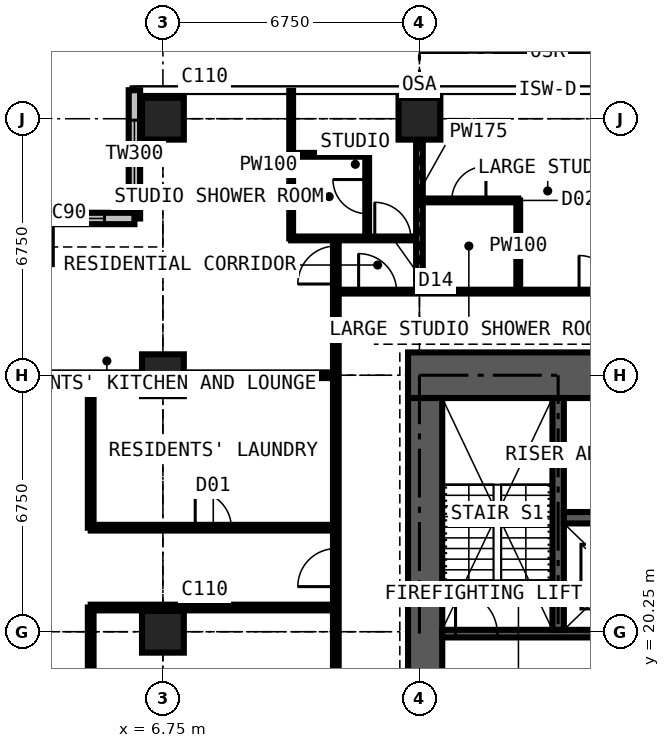
"""IFC4 building model, lengths in metres.
Left out: names, types, materials, properties, quantities, classifications, styles, units other than length and angle.
Written with IfcOpenShell. Run it as: python <this file> out.ifc"""

import sys

from ifc_helpers import new_model, si_unit, direction, frame, frame_2d, origin, origin_2d, place, context, subcontext, project, spatial, rectangle, extrude, element, fill, save


model = new_model("IFC4")
c1 = context("Model", 3, precision=1e-05, world=origin(), true_north=direction((0.0, 1.0)))
c2 = subcontext(c1, "Body", "Model", "MODEL_VIEW")
j1 = project(units=[si_unit("LENGTHUNIT", "METRE"), si_unit("PLANEANGLEUNIT", "RADIAN")], contexts=[c1])
p1 = place(None, origin())
s1 = spatial("IfcSite", under=j1, at=p1, CompositionType="ELEMENT")
p2 = place(p1, origin())
s2 = spatial("IfcBuilding", under=s1, at=p2, CompositionType="ELEMENT")
p3 = place(p2, frame((0.0, 0.0, 215.1)))
s3 = spatial("IfcBuildingStorey", under=s2, at=p3, CompositionType="ELEMENT", Elevation=215.1)
for number, where, z_axis, x_axis in (
    (1, (6.75, 20.25, 0.0), (0.0, 0.0, 1.0), (1.0, 0.0, 0.0)),
    (2, (6.75, 27.0, 0.0), (0.0, 0.0, 1.0), (1.0, 0.0, 0.0)),
    (3, (6.75, 33.75, 0.0), (0.0, 0.0, 1.0), (1.0, 0.0, 0.0)),
    (4, (13.5, 33.75, 0.0), (0.0, 0.0, 1.0), (1.0, 0.0, 0.0)),
):
    element("IfcColumn", number, at=place(p3, frame(where, z_axis=z_axis, x_axis=x_axis)), inside=s3, PredefinedType="COLUMN", context=c2, shape_type="SweptSolid", body=[
        extrude(rectangle(XDim=1.1, YDim=1.1, at=origin_2d()), origin(), (0.0, 0.0, 1.0), 3.6),
    ])
p4 = place(p3, frame((27.3, 27.0, 0.0), z_axis=(0.0, 0.0, 1.0), x_axis=(-1.0, 0.0, 0.0)))
e5 = element("IfcWall", 5, at=p4, inside=s3, PredefinedType="SHEAR", context=c2, shape_type="SweptSolid", body=[
    extrude(rectangle(XDim=14.1, YDim=1.2, at=frame_2d((7.05, 0.0))), origin(), (0.0, 0.0, 1.0), 3.6),
])
p5 = place(p4, frame((4.55, 0.0, 0.0)))
e6 = element("IfcOpeningElement", 6, at=p5, cuts=e5, PredefinedType="OPENING", context=c2, shape_type="SweptSolid", body=[
    extrude(rectangle(XDim=0.9, YDim=2.2, at=frame_2d((0.45, 1.1))), frame((0.0, 0.61, 0.0), z_axis=(0.0, -1.0, 0.0), x_axis=(1.0, 0.0, 0.0)), (0.0, 0.0, 1.0), 1.22),
])
p6 = place(p4, frame((7.525, 0.0, 0.0)))
e7 = element("IfcOpeningElement", 7, at=p6, cuts=e5, PredefinedType="OPENING", context=c2, shape_type="SweptSolid", body=[
    extrude(rectangle(XDim=1.0, YDim=2.2, at=frame_2d((0.5, 1.1))), frame((0.0, 0.61, 0.0), z_axis=(0.0, -1.0, 0.0), x_axis=(1.0, 0.0, 0.0)), (0.0, 0.0, 1.0), 1.22),
])
p7 = place(p3, frame((13.65, 26.4, 0.0), z_axis=(0.0, 0.0, 1.0), x_axis=(0.0, -1.0, 0.0)))
e8 = element("IfcWall", 8, at=p7, inside=s3, PredefinedType="SHEAR", context=c2, shape_type="SweptSolid", body=[
    extrude(rectangle(XDim=12.3, YDim=0.9, at=frame_2d((6.15, 0.0))), origin(), (0.0, 0.0, 1.0), 3.6),
])
p8 = place(p7, frame((7.45, 0.0, 0.0)))
e9 = element("IfcOpeningElement", 9, at=p8, cuts=e8, PredefinedType="OPENING", context=c2, shape_type="SweptSolid", body=[
    extrude(rectangle(XDim=1.2, YDim=2.2, at=frame_2d((0.6, 1.1))), frame((0.0, 0.46, 0.0), z_axis=(0.0, -1.0, 0.0), x_axis=(1.0, 0.0, 0.0)), (0.0, 0.0, 1.0), 0.92),
])
p9 = place(p3, frame((6.0, 34.5, 0.0), z_axis=(0.0, 0.0, 1.0), x_axis=(0.0, -1.0, 0.0)))
e10 = element("IfcWall", 10, at=p9, inside=s3, PredefinedType="SOLIDWALL", context=c2, shape_type="SweptSolid", body=[
    extrude(rectangle(XDim=3.375, YDim=0.3, at=frame_2d((1.688, 0.0))), origin(), (0.0, 0.0, 1.0), 3.375),
])
p10 = place(p9, frame((0.788, 0.0, 0.6)))
e11 = element("IfcOpeningElement", 11, at=p10, cuts=e10, PredefinedType="OPENING", context=c2, shape_type="SweptSolid", body=[
    extrude(rectangle(XDim=1.8, YDim=2.1, at=frame_2d((0.9, 1.05))), frame((0.0, 0.16, 0.0), z_axis=(0.0, -1.0, 0.0), x_axis=(1.0, 0.0, 0.0)), (0.0, 0.0, 1.0), 0.32),
])
p11 = place(p3, frame((6.0, 31.125, 0.0), z_axis=(0.0, 0.0, 1.0), x_axis=(-1.0, 0.0, 0.0)))
e12 = element("IfcWall", 12, at=p11, inside=s3, PredefinedType="SOLIDWALL", context=c2, shape_type="SweptSolid", body=[
    extrude(rectangle(XDim=3.375, YDim=0.3, at=frame_2d((1.688, 0.0))), origin(), (0.0, 0.0, 1.0), 3.375),
])
p12 = place(p11, frame((0.788, 0.0, 0.6)))
e13 = element("IfcOpeningElement", 13, at=p12, cuts=e12, PredefinedType="OPENING", context=c2, shape_type="SweptSolid", body=[
    extrude(rectangle(XDim=1.8, YDim=2.1, at=frame_2d((0.9, 1.05))), frame((0.0, 0.16, 0.0), z_axis=(0.0, -1.0, 0.0), x_axis=(1.0, 0.0, 0.0)), (0.0, 0.0, 1.0), 0.32),
])
p13 = place(p3, frame((14.1, 20.2, 0.0), z_axis=(0.0, 0.0, 1.0), x_axis=(1.0, 0.0, 0.0)))
e14 = element("IfcWall", 14, at=p13, inside=s3, PredefinedType="SHEAR", context=c2, shape_type="SweptSolid", body=[
    extrude(rectangle(XDim=12.3, YDim=0.2, at=frame_2d((6.15, 0.0))), origin(), (0.0, 0.0, 1.0), 3.6),
])
p14 = place(p13, frame((4.56, 0.0, 0.0)))
e15 = element("IfcOpeningElement", 15, at=p14, cuts=e14, PredefinedType="OPENING", context=c2, shape_type="SweptSolid", body=[
    extrude(rectangle(XDim=1.1, YDim=2.2, at=frame_2d((0.55, 1.1))), frame((0.0, 0.11, 0.0), z_axis=(0.0, -1.0, 0.0), x_axis=(1.0, 0.0, 0.0)), (0.0, 0.0, 1.0), 0.22),
])
p15 = place(p13, frame((6.7, 0.0, 0.0)))
e16 = element("IfcOpeningElement", 16, at=p15, cuts=e14, PredefinedType="OPENING", context=c2, shape_type="SweptSolid", body=[
    extrude(rectangle(XDim=1.1, YDim=2.2, at=frame_2d((0.55, 1.1))), frame((0.0, 0.11, 0.0), z_axis=(0.0, -1.0, 0.0), x_axis=(1.0, 0.0, 0.0)), (0.0, 0.0, 1.0), 0.22),
])
p16 = place(p13, frame((0.35, 0.0, 0.0)))
e17 = element("IfcOpeningElement", 17, at=p16, cuts=e14, PredefinedType="OPENING", context=c2, shape_type="SweptSolid", body=[
    extrude(rectangle(XDim=1.1, YDim=2.2, at=frame_2d((0.55, 1.1))), frame((0.0, 0.11, 0.0), z_axis=(0.0, -1.0, 0.0), x_axis=(1.0, 0.0, 0.0)), (0.0, 0.0, 1.0), 0.22),
])
p17 = place(p13, frame((9.75, 0.0, 0.0)))
e18 = element("IfcOpeningElement", 18, at=p17, cuts=e14, PredefinedType="OPENING", context=c2, shape_type="SweptSolid", body=[
    extrude(rectangle(XDim=1.1, YDim=2.2, at=frame_2d((0.55, 1.1))), frame((0.0, 0.11, 0.0), z_axis=(0.0, -1.0, 0.0), x_axis=(1.0, 0.0, 0.0)), (0.0, 0.0, 1.0), 0.22),
])
p18 = place(p3, frame((17.15, 20.3, 0.0), z_axis=(0.0, 0.0, 1.0), x_axis=(0.0, 1.0, 0.0)))
e19 = element("IfcWall", 19, at=p18, inside=s3, PredefinedType="SHEAR", context=c2, shape_type="SweptSolid", body=[
    extrude(rectangle(XDim=6.1, YDim=0.3, at=frame_2d((3.05, 0.0))), origin(), (0.0, 0.0, 1.0), 3.6),
])
p19 = place(p3, frame((17.3, 23.25, 0.0), z_axis=(0.0, 0.0, 1.0), x_axis=(1.0, 0.0, 0.0)))
e20 = element("IfcWall", 20, at=p19, inside=s3, PredefinedType="SHEAR", context=c2, shape_type="SweptSolid", body=[
    extrude(rectangle(XDim=5.9, YDim=0.3, at=frame_2d((2.95, 0.0))), origin(), (0.0, 0.0, 1.0), 3.6),
])
p20 = place(p3, frame((3.35, 27.0, 0.0), z_axis=(0.0, 0.0, 1.0), x_axis=(1.0, 0.0, 0.0)))
e21 = element("IfcWall", 21, at=p20, inside=s3, PredefinedType="PARTITIONING", context=c2, shape_type="SweptSolid", body=[
    extrude(rectangle(XDim=7.95, YDim=0.15, at=frame_2d((3.975, 0.0))), origin(), (0.0, 0.0, 1.0), 2.877),
])
p21 = place(p3, frame((4.85, 12.775, 0.0), z_axis=(0.0, 0.0, 1.0), x_axis=(0.0, 1.0, 0.0)))
e22 = element("IfcWall", 22, at=p21, inside=s3, PredefinedType="PARTITIONING", context=c2, shape_type="SweptSolid", body=[
    extrude(rectangle(XDim=8.113, YDim=0.15, at=frame_2d((4.056, 0.0))), origin(), (0.0, 0.0, 1.0), 3.375),
])
p22 = place(p21, frame((3.6, 0.0, 0.0)))
e23 = element("IfcOpeningElement", 23, at=p22, cuts=e22, PredefinedType="OPENING", context=c2, shape_type="SweptSolid", body=[
    extrude(rectangle(XDim=0.95, YDim=2.2, at=frame_2d((0.475, 1.1))), frame((0.0, 0.085, 0.0), z_axis=(0.0, -1.0, 0.0), x_axis=(1.0, 0.0, 0.0)), (0.0, 0.0, 1.0), 0.17),
])
p23 = place(p3, frame((4.85, 20.887, 0.0), z_axis=(0.0, 0.0, 1.0), x_axis=(1.0, 0.0, 0.0)))
e24 = element("IfcWall", 24, at=p23, inside=s3, PredefinedType="PARTITIONING", context=c2, shape_type="SweptSolid", body=[
    extrude(rectangle(XDim=6.45, YDim=0.15, at=frame_2d((3.225, 0.0))), origin(), (0.0, 0.0, 1.0), 3.375),
])
p24 = place(p3, frame((4.85, 22.988, 0.0), z_axis=(0.0, 0.0, 1.0), x_axis=(0.0, 1.0, 0.0)))
e25 = element("IfcWall", 25, at=p24, inside=s3, PredefinedType="PARTITIONING", context=c2, shape_type="SweptSolid", body=[
    extrude(rectangle(XDim=4.012, YDim=0.15, at=frame_2d((2.006, 0.0))), origin(), (0.0, 0.0, 1.0), 3.375),
])
p25 = place(p3, frame((4.85, 22.988, 0.0), z_axis=(0.0, 0.0, 1.0), x_axis=(1.0, 0.0, 0.0)))
e26 = element("IfcWall", 26, at=p25, inside=s3, PredefinedType="PARTITIONING", context=c2, shape_type="SweptSolid", body=[
    extrude(rectangle(XDim=6.45, YDim=0.15, at=frame_2d((3.225, 0.0))), origin(), (0.0, 0.0, 1.0), 3.375),
])
p26 = place(p25, frame((2.75, 0.0, 0.0)))
e27 = element("IfcOpeningElement", 27, at=p26, cuts=e26, PredefinedType="OPENING", context=c2, shape_type="SweptSolid", body=[
    extrude(rectangle(XDim=0.95, YDim=2.2, at=frame_2d((0.475, 1.1))), frame((0.0, 0.085, 0.0), z_axis=(0.0, -1.0, 0.0), x_axis=(1.0, 0.0, 0.0)), (0.0, 0.0, 1.0), 0.17),
])
p27 = place(p3, frame((10.125, 30.6, 0.0), z_axis=(0.0, 0.0, 1.0), x_axis=(0.0, 1.0, 0.0)))
e28 = element("IfcWall", 28, at=p27, inside=s3, PredefinedType="PARTITIONING", context=c2, shape_type="SweptSolid", body=[
    extrude(rectangle(XDim=3.884, YDim=0.1, at=frame_2d((1.942, 0.0))), origin(), (0.0, 0.0, 1.0), 3.375),
])
p28 = place(p3, frame((10.125, 30.6, 0.0), z_axis=(0.0, 0.0, 1.0), x_axis=(1.0, 0.0, 0.0)))
e29 = element("IfcWall", 29, at=p28, inside=s3, PredefinedType="PARTITIONING", context=c2, shape_type="SweptSolid", body=[
    extrude(rectangle(XDim=3.375, YDim=0.1, at=frame_2d((1.688, 0.0))), origin(), (0.0, 0.0, 1.0), 3.375),
])
p29 = place(p28, frame((2.2, 0.0, 0.0)))
e30 = element("IfcOpeningElement", 30, at=p29, cuts=e29, PredefinedType="OPENING", context=c2, shape_type="SweptSolid", body=[
    extrude(rectangle(XDim=0.95, YDim=2.2, at=frame_2d((0.475, 1.1))), frame((0.0, 0.06, 0.0), z_axis=(0.0, -1.0, 0.0), x_axis=(1.0, 0.0, 0.0)), (0.0, 0.0, 1.0), 0.12),
])
p30 = place(p3, frame((10.125, 32.8, 0.0), z_axis=(0.0, 0.0, 1.0), x_axis=(1.0, 0.0, 0.0)))
e31 = element("IfcWall", 31, at=p30, inside=s3, PredefinedType="PARTITIONING", context=c2, shape_type="SweptSolid", body=[
    extrude(rectangle(XDim=2.0, YDim=0.1, at=frame_2d((1.0, 0.0))), origin(), (0.0, 0.0, 1.0), 3.375),
])
p31 = place(p3, frame((11.3, 11.3, 0.0), z_axis=(0.0, 0.0, 1.0), x_axis=(0.0, 1.0, 0.0)))
e32 = element("IfcWall", 32, at=p31, inside=s3, PredefinedType="PARTITIONING", context=c2, shape_type="SweptSolid", body=[
    extrude(rectangle(XDim=19.3, YDim=0.15, at=frame_2d((9.65, 0.0))), origin(), (0.0, 0.0, 1.0), 3.375),
])
p32 = place(p31, frame((18.1, 0.0, 0.0)))
e33 = element("IfcOpeningElement", 33, at=p32, cuts=e32, PredefinedType="OPENING", context=c2, shape_type="SweptSolid", body=[
    extrude(rectangle(XDim=1.0, YDim=2.2, at=frame_2d((0.5, 1.1))), frame((0.0, 0.085, 0.0), z_axis=(0.0, -1.0, 0.0), x_axis=(1.0, 0.0, 0.0)), (0.0, 0.0, 1.0), 0.17),
])
p33 = place(p31, frame((10.137, 0.0, 0.0)))
e34 = element("IfcOpeningElement", 34, at=p33, cuts=e32, PredefinedType="OPENING", context=c2, shape_type="SweptSolid", body=[
    extrude(rectangle(XDim=1.0, YDim=2.2, at=frame_2d((0.5, 1.1))), frame((0.0, 0.085, 0.0), z_axis=(0.0, -1.0, 0.0), x_axis=(1.0, 0.0, 0.0)), (0.0, 0.0, 1.0), 0.17),
])
p34 = place(p3, frame((11.3, 29.2, 0.0), z_axis=(0.0, 0.0, 1.0), x_axis=(1.0, 0.0, 0.0)))
e35 = element("IfcWall", 35, at=p34, inside=s3, PredefinedType="PARTITIONING", context=c2, shape_type="SweptSolid", body=[
    extrude(rectangle(XDim=19.809, YDim=0.1, at=frame_2d((9.904, 0.0))), origin(), (0.0, 0.0, 1.0), 3.375),
])
p35 = place(p34, frame((16.3, 0.0, 0.0)))
e36 = element("IfcOpeningElement", 36, at=p35, cuts=e35, PredefinedType="OPENING", context=c2, shape_type="SweptSolid", body=[
    extrude(rectangle(XDim=1.0, YDim=2.2, at=frame_2d((0.5, 1.1))), frame((0.0, 0.06, 0.0), z_axis=(0.0, -1.0, 0.0), x_axis=(1.0, 0.0, 0.0)), (0.0, 0.0, 1.0), 0.12),
])
p36 = place(p34, frame((6.4, 0.0, 0.0)))
e37 = element("IfcOpeningElement", 37, at=p36, cuts=e35, PredefinedType="OPENING", context=c2, shape_type="SweptSolid", body=[
    extrude(rectangle(XDim=0.95, YDim=2.2, at=frame_2d((0.475, 1.1))), frame((0.0, 0.06, 0.0), z_axis=(0.0, -1.0, 0.0), x_axis=(1.0, 0.0, 0.0)), (0.0, 0.0, 1.0), 0.12),
])
p37 = place(p34, frame((13.15, 0.0, 0.0)))
e38 = element("IfcOpeningElement", 38, at=p37, cuts=e35, PredefinedType="OPENING", context=c2, shape_type="SweptSolid", body=[
    extrude(rectangle(XDim=0.95, YDim=2.2, at=frame_2d((0.475, 1.1))), frame((0.0, 0.06, 0.0), z_axis=(0.0, -1.0, 0.0), x_axis=(1.0, 0.0, 0.0)), (0.0, 0.0, 1.0), 0.12),
])
p38 = place(p34, frame((0.6, 0.0, 0.0)))
e39 = element("IfcOpeningElement", 39, at=p38, cuts=e35, PredefinedType="OPENING", context=c2, shape_type="SweptSolid", body=[
    extrude(rectangle(XDim=1.0, YDim=2.2, at=frame_2d((0.5, 1.1))), frame((0.0, 0.06, 0.0), z_axis=(0.0, -1.0, 0.0), x_axis=(1.0, 0.0, 0.0)), (0.0, 0.0, 1.0), 0.12),
])
p39 = place(p3, frame((12.125, 30.6, 0.0), z_axis=(0.0, 0.0, 1.0), x_axis=(0.0, 1.0, 0.0)))
e40 = element("IfcWall", 40, at=p39, inside=s3, PredefinedType="PARTITIONING", context=c2, shape_type="SweptSolid", body=[
    extrude(rectangle(XDim=2.2, YDim=0.1, at=frame_2d((1.1, 0.0))), origin(), (0.0, 0.0, 1.0), 3.375),
])
p40 = place(p39, frame((0.65, 0.0, 0.0)))
e41 = element("IfcOpeningElement", 41, at=p40, cuts=e40, PredefinedType="OPENING", context=c2, shape_type="SweptSolid", body=[
    extrude(rectangle(XDim=0.9, YDim=2.2, at=frame_2d((0.45, 1.1))), frame((0.0, 0.06, 0.0), z_axis=(0.0, -1.0, 0.0), x_axis=(1.0, 0.0, 0.0)), (0.0, 0.0, 1.0), 0.12),
])
p41 = place(p3, frame((13.5, 29.2, 0.0), z_axis=(0.0, 0.0, 1.0), x_axis=(0.0, 1.0, 0.0)))
e42 = element("IfcWall", 42, at=p41, inside=s3, PredefinedType="PARTITIONING", context=c2, shape_type="SweptSolid", body=[
    extrude(rectangle(XDim=5.284, YDim=0.175, at=frame_2d((2.642, 0.0))), origin(), (0.0, 0.0, 1.0), 2.61),
])
p42 = place(p3, frame((13.5, 31.6, 0.0), z_axis=(0.0, 0.0, 1.0), x_axis=(1.0, 0.0, 0.0)))
e43 = element("IfcWall", 43, at=p42, inside=s3, PredefinedType="PARTITIONING", context=c2, shape_type="SweptSolid", body=[
    extrude(rectangle(XDim=2.6, YDim=0.1, at=frame_2d((1.3, 0.0))), origin(), (0.0, 0.0, 1.0), 3.375),
])
p43 = place(p42, frame((0.85, 0.0, 0.0)))
e44 = element("IfcOpeningElement", 44, at=p43, cuts=e43, PredefinedType="OPENING", context=c2, shape_type="SweptSolid", body=[
    extrude(rectangle(XDim=0.9, YDim=2.2, at=frame_2d((0.45, 1.1))), frame((0.0, 0.06, 0.0), z_axis=(0.0, -1.0, 0.0), x_axis=(1.0, 0.0, 0.0)), (0.0, 0.0, 1.0), 0.12),
])
p44 = place(p3, frame((16.1, 29.2, 0.0), z_axis=(0.0, 0.0, 1.0), x_axis=(0.0, 1.0, 0.0)))
e45 = element("IfcWall", 45, at=p44, inside=s3, PredefinedType="PARTITIONING", context=c2, shape_type="SweptSolid", body=[
    extrude(rectangle(XDim=2.4, YDim=0.1, at=frame_2d((1.2, 0.0))), origin(), (0.0, 0.0, 1.0), 3.375),
])
p45 = place(p10, origin())
e46 = element("IfcWindow", 46, at=p45, inside=s3, PartitioningType="SINGLE_PANEL", PredefinedType="WINDOW", context=c2, shape_type="SweptSolid", body=[
    extrude(rectangle(XDim=1.8, YDim=2.1, at=frame_2d((0.9, 1.05))), frame((0.0, 0.03, 0.0), z_axis=(0.0, -1.0, 0.0), x_axis=(1.0, 0.0, 0.0)), (0.0, 0.0, 1.0), 0.06),
])
fill(e11, e46)
p46 = place(p12, origin())
e47 = element("IfcWindow", 47, at=p46, inside=s3, PartitioningType="SINGLE_PANEL", PredefinedType="WINDOW", context=c2, shape_type="SweptSolid", body=[
    extrude(rectangle(XDim=1.8, YDim=2.1, at=frame_2d((0.9, 1.05))), frame((0.0, 0.03, 0.0), z_axis=(0.0, -1.0, 0.0), x_axis=(1.0, 0.0, 0.0)), (0.0, 0.0, 1.0), 0.06),
])
fill(e13, e47)
p47 = place(p16, origin())
e48 = element("IfcDoor", 48, at=p47, inside=s3, OperationType="SINGLE_SWING_LEFT", PredefinedType="DOOR", context=c2, shape_type="SweptSolid", body=[
    extrude(rectangle(XDim=1.1, YDim=2.2, at=frame_2d((0.55, 1.1))), frame((0.0, 0.025, 0.0), z_axis=(0.0, -1.0, 0.0), x_axis=(1.0, 0.0, 0.0)), (0.0, 0.0, 1.0), 0.05),
])
fill(e17, e48)
p48 = place(p36, origin())
e49 = element("IfcDoor", 49, at=p48, inside=s3, OperationType="SINGLE_SWING_LEFT", PredefinedType="DOOR", context=c2, shape_type="SweptSolid", body=[
    extrude(rectangle(XDim=0.95, YDim=2.2, at=frame_2d((0.475, 1.1))), frame((0.0, 0.025, 0.0), z_axis=(0.0, -1.0, 0.0), x_axis=(1.0, 0.0, 0.0)), (0.0, 0.0, 1.0), 0.05),
])
fill(e37, e49)
p49 = place(p43, origin())
e50 = element("IfcDoor", 50, at=p49, inside=s3, OperationType="SINGLE_SWING_RIGHT", PredefinedType="DOOR", context=c2, shape_type="SweptSolid", body=[
    extrude(rectangle(XDim=0.9, YDim=2.2, at=frame_2d((0.45, 1.1))), frame((0.0, 0.025, 0.0), z_axis=(0.0, -1.0, 0.0), x_axis=(1.0, 0.0, 0.0)), (0.0, 0.0, 1.0), 0.05),
])
fill(e44, e50)
p50 = place(p29, origin())
e51 = element("IfcDoor", 51, at=p50, inside=s3, OperationType="SINGLE_SWING_LEFT", PredefinedType="DOOR", context=c2, shape_type="SweptSolid", body=[
    extrude(rectangle(XDim=0.95, YDim=2.2, at=frame_2d((0.475, 1.1))), frame((0.0, 0.025, 0.0), z_axis=(0.0, -1.0, 0.0), x_axis=(1.0, 0.0, 0.0)), (0.0, 0.0, 1.0), 0.05),
])
fill(e30, e51)
p51 = place(p40, origin())
e52 = element("IfcDoor", 52, at=p51, inside=s3, OperationType="SINGLE_SWING_RIGHT", PredefinedType="DOOR", context=c2, shape_type="SweptSolid", body=[
    extrude(rectangle(XDim=0.9, YDim=2.2, at=frame_2d((0.45, 1.1))), frame((0.0, 0.025, 0.0), z_axis=(0.0, -1.0, 0.0), x_axis=(1.0, 0.0, 0.0)), (0.0, 0.0, 1.0), 0.05),
])
fill(e41, e52)
p52 = place(p38, origin())
e53 = element("IfcDoor", 53, at=p52, inside=s3, OperationType="SINGLE_SWING_LEFT", PredefinedType="DOOR", context=c2, shape_type="SweptSolid", body=[
    extrude(rectangle(XDim=1.0, YDim=2.2, at=frame_2d((0.5, 1.1))), frame((0.0, 0.025, 0.0), z_axis=(0.0, -1.0, 0.0), x_axis=(1.0, 0.0, 0.0)), (0.0, 0.0, 1.0), 0.05),
])
fill(e39, e53)
p53 = place(p32, origin())
e54 = element("IfcDoor", 54, at=p53, inside=s3, OperationType="SINGLE_SWING_LEFT", PredefinedType="DOOR", context=c2, shape_type="SweptSolid", body=[
    extrude(rectangle(XDim=1.0, YDim=2.2, at=frame_2d((0.5, 1.1))), frame((0.0, 0.025, 0.0), z_axis=(0.0, -1.0, 0.0), x_axis=(1.0, 0.0, 0.0)), (0.0, 0.0, 1.0), 0.05),
])
fill(e33, e54)
p54 = place(p33, origin())
e55 = element("IfcDoor", 55, at=p54, inside=s3, OperationType="SINGLE_SWING_LEFT", PredefinedType="DOOR", context=c2, shape_type="SweptSolid", body=[
    extrude(rectangle(XDim=1.0, YDim=2.2, at=frame_2d((0.5, 1.1))), frame((0.0, 0.025, 0.0), z_axis=(0.0, -1.0, 0.0), x_axis=(1.0, 0.0, 0.0)), (0.0, 0.0, 1.0), 0.05),
])
fill(e34, e55)
p55 = place(p26, origin())
e56 = element("IfcDoor", 56, at=p55, inside=s3, OperationType="SINGLE_SWING_LEFT", PredefinedType="DOOR", context=c2, shape_type="SweptSolid", body=[
    extrude(rectangle(XDim=0.95, YDim=2.2, at=frame_2d((0.475, 1.1))), frame((0.0, 0.025, 0.0), z_axis=(0.0, -1.0, 0.0), x_axis=(1.0, 0.0, 0.0)), (0.0, 0.0, 1.0), 0.05),
])
fill(e27, e56)
save(model, sys.argv[1])
